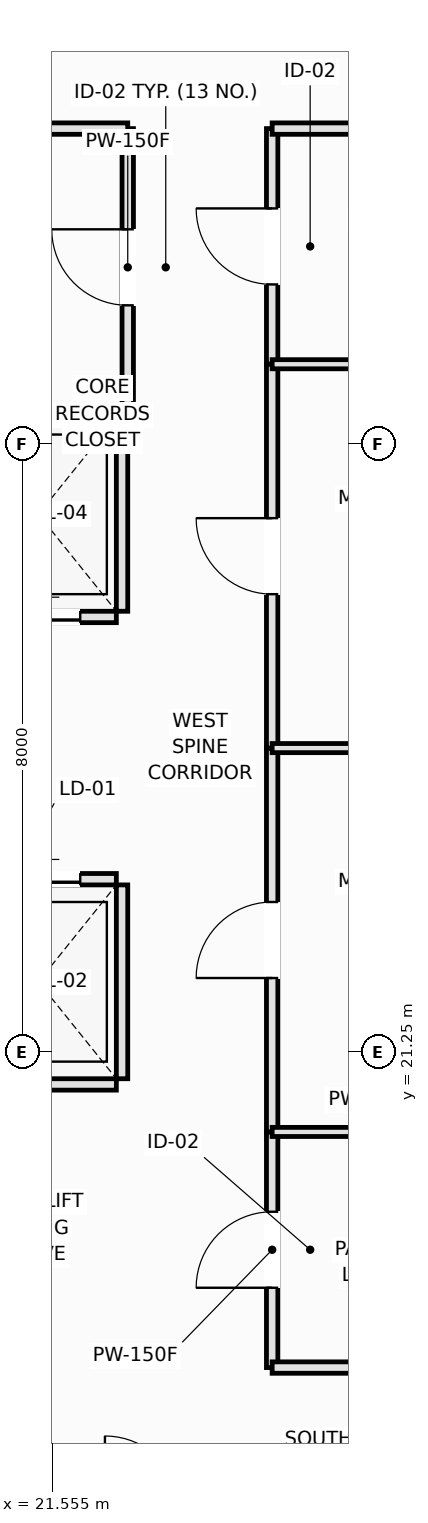
"""IFC4 building model, lengths in metres.
Left out: names, types, materials, properties, quantities, classifications, styles, units other than length and angle.
Written with IfcOpenShell. Run it as: python <this file> out.ifc"""

import sys

from ifc_helpers import new_model, si_unit, direction, frame, frame_2d, origin, place, context, subcontext, project, spatial, rectangle, extrude, element, fill, save


model = new_model("IFC4")
c1 = context("Model", 3, precision=1e-05, world=origin(), true_north=direction((0.0, 1.0)))
c2 = subcontext(c1, "Body", "Model", "MODEL_VIEW")
j1 = project(units=[si_unit("LENGTHUNIT", "METRE"), si_unit("PLANEANGLEUNIT", "RADIAN")], contexts=[c1])
p1 = place(None, origin())
s1 = spatial("IfcSite", under=j1, at=p1, CompositionType="ELEMENT")
p2 = place(p1, origin())
s2 = spatial("IfcBuilding", under=s1, at=p2, CompositionType="ELEMENT")
p3 = place(p2, frame((0.0, 0.0, 36.25)))
s3 = spatial("IfcBuildingStorey", under=s2, at=p3, CompositionType="ELEMENT", Elevation=36.25)
p4 = place(p3, frame((20.35, 20.825, 0.0), z_axis=(0.0, 0.0, 1.0), x_axis=(1.0, 0.0, 0.0)))
e1 = element("IfcWall", 1, at=p4, inside=s3, PredefinedType="PARTITIONING", context=c2, shape_type="SweptSolid", body=[
    extrude(rectangle(XDim=2.05, YDim=0.15, at=frame_2d((1.025, 0.0))), origin(), (0.0, 0.0, 1.0), 3.37),
])
p5 = place(p3, frame((20.35, 23.525, 0.0), z_axis=(0.0, 0.0, 1.0), x_axis=(1.0, 0.0, 0.0)))
e2 = element("IfcWall", 2, at=p5, inside=s3, PredefinedType="PARTITIONING", context=c2, shape_type="SweptSolid", body=[
    extrude(rectangle(XDim=2.05, YDim=0.15, at=frame_2d((1.025, 0.0))), origin(), (0.0, 0.0, 1.0), 3.37),
])
p6 = place(p5, frame((0.475, 0.0, 0.0)))
e3 = element("IfcOpeningElement", 3, at=p6, cuts=e2, PredefinedType="OPENING", context=c2, shape_type="SweptSolid", body=[
    extrude(rectangle(XDim=1.1, YDim=2.2, at=frame_2d((0.55, 1.1))), frame((0.0, 0.085, 0.0), z_axis=(0.0, -1.0, 0.0), x_axis=(1.0, 0.0, 0.0)), (0.0, 0.0, 1.0), 0.17),
])
p7 = place(p3, frame((22.475, 20.9, 0.0), z_axis=(0.0, 0.0, 1.0), x_axis=(0.0, 1.0, 0.0)))
e4 = element("IfcWall", 4, at=p7, inside=s3, PredefinedType="PARTITIONING", context=c2, shape_type="SweptSolid", body=[
    extrude(rectangle(XDim=2.55, YDim=0.15, at=frame_2d((1.275, 0.0))), origin(), (0.0, 0.0, 1.0), 3.37),
])
p8 = place(p3, frame((20.35, 26.975, 0.0), z_axis=(0.0, 0.0, 1.0), x_axis=(1.0, 0.0, 0.0)))
e5 = element("IfcWall", 5, at=p8, inside=s3, PredefinedType="PARTITIONING", context=c2, shape_type="SweptSolid", body=[
    extrude(rectangle(XDim=2.05, YDim=0.15, at=frame_2d((1.025, 0.0))), origin(), (0.0, 0.0, 1.0), 3.37),
])
p9 = place(p8, frame((0.475, 0.0, 0.0)))
e6 = element("IfcOpeningElement", 6, at=p9, cuts=e5, PredefinedType="OPENING", context=c2, shape_type="SweptSolid", body=[
    extrude(rectangle(XDim=1.1, YDim=2.2, at=frame_2d((0.55, 1.1))), frame((0.0, 0.085, 0.0), z_axis=(0.0, -1.0, 0.0), x_axis=(1.0, 0.0, 0.0)), (0.0, 0.0, 1.0), 0.17),
])
p10 = place(p3, frame((20.35, 29.675, 0.0), z_axis=(0.0, 0.0, 1.0), x_axis=(1.0, 0.0, 0.0)))
e7 = element("IfcWall", 7, at=p10, inside=s3, PredefinedType="PARTITIONING", context=c2, shape_type="SweptSolid", body=[
    extrude(rectangle(XDim=2.05, YDim=0.15, at=frame_2d((1.025, 0.0))), origin(), (0.0, 0.0, 1.0), 3.37),
])
p11 = place(p3, frame((22.475, 27.05, 0.0), z_axis=(0.0, 0.0, 1.0), x_axis=(0.0, 1.0, 0.0)))
e8 = element("IfcWall", 8, at=p11, inside=s3, PredefinedType="PARTITIONING", context=c2, shape_type="SweptSolid", body=[
    extrude(rectangle(XDim=2.55, YDim=0.15, at=frame_2d((1.275, 0.0))), origin(), (0.0, 0.0, 1.0), 3.37),
])
p12 = place(p3, frame((22.55, 29.75, 0.0), z_axis=(0.0, 0.0, 1.0), x_axis=(0.0, 1.0, 0.0)))
e9 = element("IfcWall", 9, at=p12, inside=s3, PredefinedType="PARTITIONING", context=c2, shape_type="SweptSolid", body=[
    extrude(rectangle(XDim=3.65, YDim=0.15, at=frame_2d((1.825, 0.0))), origin(), (0.0, 0.0, 1.0), 3.01),
])
p13 = place(p12, frame((1.325, 0.0, 0.0)))
e10 = element("IfcOpeningElement", 10, at=p13, cuts=e9, PredefinedType="OPENING", context=c2, shape_type="SweptSolid", body=[
    extrude(rectangle(XDim=1.0, YDim=2.15, at=frame_2d((0.5, 1.075))), frame((0.0, 0.085, 0.0), z_axis=(0.0, -1.0, 0.0), x_axis=(1.0, 0.0, 0.0)), (0.0, 0.0, 1.0), 0.17),
])
p14 = place(p3, frame((24.45, 17.1, 0.0), z_axis=(0.0, 0.0, 1.0), x_axis=(0.0, 1.0, 0.0)))
e11 = element("IfcWall", 11, at=p14, inside=s3, PredefinedType="PARTITIONING", context=c2, shape_type="SweptSolid", body=[
    extrude(rectangle(XDim=3.1, YDim=0.15, at=frame_2d((1.55, 0.0))), origin(), (0.0, 0.0, 1.0), 3.37),
])
p15 = place(p14, frame((1.05, 0.0, 0.0)))
e12 = element("IfcOpeningElement", 12, at=p15, cuts=e11, PredefinedType="OPENING", context=c2, shape_type="SweptSolid", body=[
    extrude(rectangle(XDim=1.0, YDim=2.15, at=frame_2d((0.5, 1.075))), frame((0.0, 0.085, 0.0), z_axis=(0.0, -1.0, 0.0), x_axis=(1.0, 0.0, 0.0)), (0.0, 0.0, 1.0), 0.17),
])
p16 = place(p3, frame((24.45, 30.3, 0.0), z_axis=(0.0, 0.0, 1.0), x_axis=(0.0, 1.0, 0.0)))
e13 = element("IfcWall", 13, at=p16, inside=s3, PredefinedType="PARTITIONING", context=c2, shape_type="SweptSolid", body=[
    extrude(rectangle(XDim=3.1, YDim=0.15, at=frame_2d((1.55, 0.0))), origin(), (0.0, 0.0, 1.0), 3.37),
])
p17 = place(p16, frame((1.05, 0.0, 0.0)))
e14 = element("IfcOpeningElement", 14, at=p17, cuts=e13, PredefinedType="OPENING", context=c2, shape_type="SweptSolid", body=[
    extrude(rectangle(XDim=1.0, YDim=2.15, at=frame_2d((0.5, 1.075))), frame((0.0, 0.085, 0.0), z_axis=(0.0, -1.0, 0.0), x_axis=(1.0, 0.0, 0.0)), (0.0, 0.0, 1.0), 0.17),
])
p18 = place(p3, frame((24.45, 20.2, 0.0), z_axis=(0.0, 0.0, 1.0), x_axis=(0.0, 1.0, 0.0)))
e15 = element("IfcWall", 15, at=p18, inside=s3, PredefinedType="PARTITIONING", context=c2, shape_type="SweptSolid", body=[
    extrude(rectangle(XDim=5.05, YDim=0.15, at=frame_2d((2.525, 0.0))), origin(), (0.0, 0.0, 1.0), 3.37),
])
p19 = place(p18, frame((2.025, 0.0, 0.0)))
e16 = element("IfcOpeningElement", 16, at=p19, cuts=e15, PredefinedType="OPENING", context=c2, shape_type="SweptSolid", body=[
    extrude(rectangle(XDim=1.0, YDim=2.15, at=frame_2d((0.5, 1.075))), frame((0.0, 0.085, 0.0), z_axis=(0.0, -1.0, 0.0), x_axis=(1.0, 0.0, 0.0)), (0.0, 0.0, 1.0), 0.17),
])
p20 = place(p3, frame((24.45, 25.25, 0.0), z_axis=(0.0, 0.0, 1.0), x_axis=(0.0, 1.0, 0.0)))
e17 = element("IfcWall", 17, at=p20, inside=s3, PredefinedType="PARTITIONING", context=c2, shape_type="SweptSolid", body=[
    extrude(rectangle(XDim=5.05, YDim=0.15, at=frame_2d((2.525, 0.0))), origin(), (0.0, 0.0, 1.0), 3.37),
])
p21 = place(p20, frame((2.025, 0.0, 0.0)))
e18 = element("IfcOpeningElement", 18, at=p21, cuts=e17, PredefinedType="OPENING", context=c2, shape_type="SweptSolid", body=[
    extrude(rectangle(XDim=1.0, YDim=2.15, at=frame_2d((0.5, 1.075))), frame((0.0, 0.085, 0.0), z_axis=(0.0, -1.0, 0.0), x_axis=(1.0, 0.0, 0.0)), (0.0, 0.0, 1.0), 0.17),
])
p22 = place(p3, frame((24.45, 17.1, 0.0), z_axis=(0.0, 0.0, 1.0), x_axis=(1.0, 0.0, 0.0)))
e19 = element("IfcWall", 19, at=p22, inside=s3, PredefinedType="PARTITIONING", context=c2, shape_type="SweptSolid", body=[
    extrude(rectangle(XDim=2.45, YDim=0.15, at=frame_2d((1.225, 0.0))), origin(), (0.0, 0.0, 1.0), 3.37),
])
p23 = place(p3, frame((21.25, 33.4, 0.0), z_axis=(0.0, 0.0, 1.0), x_axis=(1.0, 0.0, 0.0)))
e20 = element("IfcWall", 20, at=p23, inside=s3, PredefinedType="PARTITIONING", context=c2, shape_type="SweptSolid", body=[
    extrude(rectangle(XDim=1.3, YDim=0.15, at=frame_2d((0.65, 0.0))), origin(), (0.0, 0.0, 1.0), 3.37),
])
p24 = place(p3, frame((24.45, 33.4, 0.0), z_axis=(0.0, 0.0, 1.0), x_axis=(1.0, 0.0, 0.0)))
e21 = element("IfcWall", 21, at=p24, inside=s3, PredefinedType="PARTITIONING", context=c2, shape_type="SweptSolid", body=[
    extrude(rectangle(XDim=2.45, YDim=0.15, at=frame_2d((1.225, 0.0))), origin(), (0.0, 0.0, 1.0), 3.37),
])
for number, where, z_axis, x_axis in (
    (22, (24.45, 20.2, 0.0), (0.0, 0.0, 1.0), (1.0, 0.0, 0.0)),
    (23, (24.45, 30.3, 0.0), (0.0, 0.0, 1.0), (1.0, 0.0, 0.0)),
):
    element("IfcWall", number, at=place(p3, frame(where, z_axis=z_axis, x_axis=x_axis)), inside=s3, PredefinedType="PARTITIONING", context=c2, shape_type="SweptSolid", body=[
        extrude(rectangle(XDim=2.45, YDim=0.12, at=frame_2d((1.225, 0.0))), origin(), (0.0, 0.0, 1.0), 3.37),
    ])
p25 = place(p3, frame((24.45, 25.25, 0.0), z_axis=(0.0, 0.0, 1.0), x_axis=(1.0, 0.0, 0.0)))
e24 = element("IfcWall", 24, at=p25, inside=s3, PredefinedType="PARTITIONING", context=c2, shape_type="SweptSolid", body=[
    extrude(rectangle(XDim=3.05, YDim=0.12, at=frame_2d((1.525, 0.0))), origin(), (0.0, 0.0, 1.0), 2.72),
])
p26 = place(p6, origin())
e25 = element("IfcDoor", 25, at=p26, inside=s3, OperationType="DOUBLE_DOOR_SLIDING", PredefinedType="DOOR", context=c2, shape_type="SweptSolid", body=[
    extrude(rectangle(XDim=1.1, YDim=2.2, at=frame_2d((0.55, 1.1))), frame((0.0, 0.025, 0.0), z_axis=(0.0, -1.0, 0.0), x_axis=(1.0, 0.0, 0.0)), (0.0, 0.0, 1.0), 0.05),
])
fill(e3, e25)
p27 = place(p9, origin())
e26 = element("IfcDoor", 26, at=p27, inside=s3, OperationType="DOUBLE_DOOR_SLIDING", PredefinedType="DOOR", context=c2, shape_type="SweptSolid", body=[
    extrude(rectangle(XDim=1.1, YDim=2.2, at=frame_2d((0.55, 1.1))), frame((0.0, 0.025, 0.0), z_axis=(0.0, -1.0, 0.0), x_axis=(1.0, 0.0, 0.0)), (0.0, 0.0, 1.0), 0.05),
])
fill(e6, e26)
p28 = place(p13, origin())
e27 = element("IfcDoor", 27, at=p28, inside=s3, OperationType="SINGLE_SWING_RIGHT", PredefinedType="DOOR", context=c2, shape_type="SweptSolid", body=[
    extrude(rectangle(XDim=1.0, YDim=2.15, at=frame_2d((0.5, 1.075))), frame((0.0, 0.025, 0.0), z_axis=(0.0, -1.0, 0.0), x_axis=(1.0, 0.0, 0.0)), (0.0, 0.0, 1.0), 0.05),
])
fill(e10, e27)
p29 = place(p15, origin())
e28 = element("IfcDoor", 28, at=p29, inside=s3, OperationType="SINGLE_SWING_LEFT", PredefinedType="DOOR", context=c2, shape_type="SweptSolid", body=[
    extrude(rectangle(XDim=1.0, YDim=2.15, at=frame_2d((0.5, 1.075))), frame((0.0, 0.025, 0.0), z_axis=(0.0, -1.0, 0.0), x_axis=(1.0, 0.0, 0.0)), (0.0, 0.0, 1.0), 0.05),
])
fill(e12, e28)
p30 = place(p17, origin())
e29 = element("IfcDoor", 29, at=p30, inside=s3, OperationType="SINGLE_SWING_RIGHT", PredefinedType="DOOR", context=c2, shape_type="SweptSolid", body=[
    extrude(rectangle(XDim=1.0, YDim=2.15, at=frame_2d((0.5, 1.075))), frame((0.0, 0.025, 0.0), z_axis=(0.0, -1.0, 0.0), x_axis=(1.0, 0.0, 0.0)), (0.0, 0.0, 1.0), 0.05),
])
fill(e14, e29)
p31 = place(p19, origin())
e30 = element("IfcDoor", 30, at=p31, inside=s3, OperationType="SINGLE_SWING_LEFT", PredefinedType="DOOR", context=c2, shape_type="SweptSolid", body=[
    extrude(rectangle(XDim=1.0, YDim=2.15, at=frame_2d((0.5, 1.075))), frame((0.0, 0.025, 0.0), z_axis=(0.0, -1.0, 0.0), x_axis=(1.0, 0.0, 0.0)), (0.0, 0.0, 1.0), 0.05),
])
fill(e16, e30)
p32 = place(p21, origin())
e31 = element("IfcDoor", 31, at=p32, inside=s3, OperationType="SINGLE_SWING_RIGHT", PredefinedType="DOOR", context=c2, shape_type="SweptSolid", body=[
    extrude(rectangle(XDim=1.0, YDim=2.15, at=frame_2d((0.5, 1.075))), frame((0.0, 0.025, 0.0), z_axis=(0.0, -1.0, 0.0), x_axis=(1.0, 0.0, 0.0)), (0.0, 0.0, 1.0), 0.05),
])
fill(e18, e31)
save(model, sys.argv[1])
